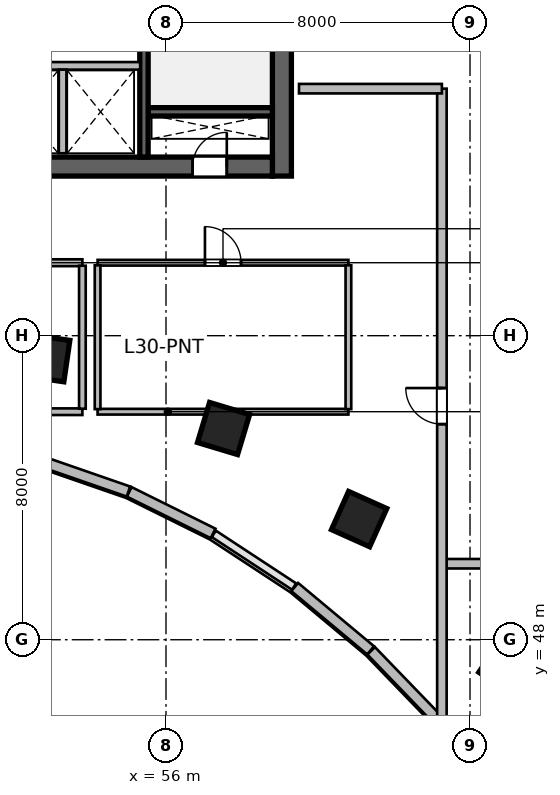
"""IFC4 building model, lengths in metres.
Left out: names, types, materials, properties, quantities, classifications, styles, units other than length and angle.
Written with IfcOpenShell. Run it as: python <this file> out.ifc"""

import sys

from ifc_helpers import new_model, si_unit, direction, frame, frame_2d, origin, origin_2d, place, context, subcontext, project, spatial, rectangle, extrude, source, transform, mapped, element, fill, save


model = new_model("IFC4")
c1 = context("Model", 3, precision=1e-05, world=origin(), true_north=direction((0.0, 1.0)))
c2 = subcontext(c1, "Body", "Model", "MODEL_VIEW")
j1 = project(units=[si_unit("LENGTHUNIT", "METRE"), si_unit("PLANEANGLEUNIT", "RADIAN")], contexts=[c1])
p1 = place(None, origin())
s1 = spatial("IfcSite", under=j1, at=p1, CompositionType="ELEMENT")
p2 = place(p1, origin())
s2 = spatial("IfcBuilding", under=s1, at=p2, CompositionType="ELEMENT")
p3 = place(p2, frame((0.0, 0.0, 127.2)))
s3 = spatial("IfcBuildingStorey", under=s2, at=p3, CompositionType="ELEMENT", Elevation=127.2)
m1 = source(origin(), c2, "Body", "SweptSolid", [
    extrude(rectangle(XDim=12.0, YDim=0.5, at=frame_2d((6.0, 0.0))), origin(), (0.0, 0.0, 1.0), 3.9),
])
p4 = place(p3, frame((59.05, 60.2, 0.0), z_axis=(0.0, 0.0, 1.0), x_axis=(0.0, 1.0, 0.0)))
e1 = element("IfcWall", 1, at=p4, inside=s3, PredefinedType="SHEAR", context=c2, shape_type="MappedRepresentation", body=[
    mapped(m1, transform((0.0, 0.0, 0.0), scale=1.0)),
])
m2 = source(origin(), c2, "Body", "SweptSolid", [
    extrude(rectangle(XDim=21.6, YDim=0.5, at=frame_2d((10.8, 0.0))), origin(), (0.0, 0.0, 1.0), 3.9),
])
p5 = place(p3, frame((37.2, 60.45, 0.0), z_axis=(0.0, 0.0, 1.0), x_axis=(1.0, 0.0, 0.0)))
e2 = element("IfcWall", 2, at=p5, inside=s3, PredefinedType="SHEAR", context=c2, shape_type="MappedRepresentation", body=[
    mapped(m2, transform((0.0, 0.0, 0.0), scale=1.0)),
])
p6 = place(p5, frame((1.1, 0.0, 0.0)))
e3 = element("IfcOpeningElement", 3, at=p6, cuts=e2, PredefinedType="OPENING", context=c2, shape_type="SweptSolid", body=[
    extrude(rectangle(XDim=1.15, YDim=2.15, at=frame_2d((0.575, 1.075))), frame((0.0, 0.26, 0.0), z_axis=(0.0, -1.0, 0.0), x_axis=(1.0, 0.0, 0.0)), (0.0, 0.0, 1.0), 0.52),
])
p7 = place(p5, frame((19.5, 0.0, 0.0)))
e4 = element("IfcOpeningElement", 4, at=p7, cuts=e2, PredefinedType="OPENING", context=c2, shape_type="SweptSolid", body=[
    extrude(rectangle(XDim=0.9, YDim=2.1, at=frame_2d((0.45, 1.05))), frame((0.0, 0.26, 0.0), z_axis=(0.0, -1.0, 0.0), x_axis=(1.0, 0.0, 0.0)), (0.0, 0.0, 1.0), 0.52),
])
p8 = place(p5, frame((12.02, 0.0, 0.0)))
e5 = element("IfcOpeningElement", 5, at=p8, cuts=e2, PredefinedType="OPENING", context=c2, shape_type="SweptSolid", body=[
    extrude(rectangle(XDim=1.6, YDim=2.15, at=frame_2d((0.8, 1.075))), frame((0.0, 0.26, 0.0), z_axis=(0.0, -1.0, 0.0), x_axis=(1.0, 0.0, 0.0)), (0.0, 0.0, 1.0), 0.52),
])
m3 = source(origin(), c2, "Body", "SweptSolid", [
    extrude(rectangle(XDim=3.27, YDim=0.22, at=frame_2d((1.635, 0.0))), origin(), (0.0, 0.0, 1.0), 3.9),
])
p9 = place(p3, frame((55.53, 61.89, 0.0), z_axis=(0.0, 0.0, 1.0), x_axis=(1.0, 0.0, 0.0)))
e6 = element("IfcWall", 6, at=p9, inside=s3, PredefinedType="SHEAR", context=c2, shape_type="MappedRepresentation", body=[
    mapped(m3, transform((0.0, 0.0, 0.0), scale=1.0)),
])
m4 = source(origin(), c2, "Body", "SweptSolid", [
    extrude(rectangle(XDim=11.0, YDim=0.22, at=frame_2d((5.5, 0.0))), origin(), (0.0, 0.0, 1.0), 3.9),
])
p10 = place(p3, frame((55.42, 60.7, 0.0), z_axis=(0.0, 0.0, 1.0), x_axis=(0.0, 1.0, 0.0)))
e7 = element("IfcWall", 7, at=p10, inside=s3, PredefinedType="SHEAR", context=c2, shape_type="MappedRepresentation", body=[
    mapped(m4, transform((0.0, 0.0, 0.0), scale=1.0)),
])
p11 = place(p10, frame((9.545, 0.0, 0.0)))
e8 = element("IfcOpeningElement", 8, at=p11, cuts=e7, PredefinedType="OPENING", context=c2, shape_type="SweptSolid", body=[
    extrude(rectangle(XDim=1.15, YDim=2.15, at=frame_2d((0.575, 1.075))), frame((0.0, 0.12, 0.0), z_axis=(0.0, -1.0, 0.0), x_axis=(1.0, 0.0, 0.0)), (0.0, 0.0, 1.0), 0.24),
])
m5 = source(origin(), c2, "Body", "SweptSolid", [
    extrude(rectangle(XDim=1.1, YDim=1.1, at=origin_2d()), origin(), (0.0, 0.0, 1.0), 3.9),
])
for number, where, z_axis, x_axis in (
    (9, (52.846, 55.411, 0.0), (0.0, 0.0, 1.0), (0.143, 0.99, 0.0)),
    (10, (57.515, 53.558, 0.0), (0.0, 0.0, 1.0), (0.289, 0.957, 0.0)),
    (11, (61.082, 51.175, 0.0), (0.0, 0.0, 1.0), (0.409, 0.912, 0.0)),
    (12, (64.996, 47.294, 0.0), (0.0, 0.0, 1.0), (0.558, 0.83, 0.0)),
):
    element("IfcColumn", number, at=place(p3, frame(where, z_axis=z_axis, x_axis=x_axis)), inside=s3, PredefinedType="COLUMN", context=c2, shape_type="MappedRepresentation", body=[
        mapped(m5, transform((0.0, 0.0, 0.0), scale=1.0)),
    ])
m6 = source(origin(), c2, "Body", "SweptSolid", [
    extrude(rectangle(XDim=2.68, YDim=0.28, at=frame_2d((1.34, 0.0))), origin(), (0.0, 0.0, 1.0), 3.65),
])
p12 = place(p3, frame((63.26, 45.78, 0.0), z_axis=(0.0, 0.0, 1.0), x_axis=(-0.694561996568, 0.719432855049, 0.0)))
e13 = element("IfcWall", 13, at=p12, inside=s3, PredefinedType="SOLIDWALL", context=c2, shape_type="MappedRepresentation", body=[
    mapped(m6, transform((0.0, 0.0, 0.0), scale=1.0)),
])
m7 = source(origin(), c2, "Body", "SweptSolid", [
    extrude(rectangle(XDim=2.601, YDim=0.28, at=frame_2d((1.3, 0.0))), origin(), (0.0, 0.0, 1.0), 3.65),
])
p13 = place(p3, frame((61.385, 47.721, 0.0), z_axis=(0.0, 0.0, 1.0), x_axis=(-0.76796730295, 0.640489048775, 0.0)))
e14 = element("IfcWall", 14, at=p13, inside=s3, PredefinedType="SOLIDWALL", context=c2, shape_type="MappedRepresentation", body=[
    mapped(m7, transform((0.0, 0.0, 0.0), scale=1.0)),
])
m8 = source(origin(), c2, "Body", "SweptSolid", [
    extrude(rectangle(XDim=2.462, YDim=0.28, at=frame_2d((1.231, 0.0))), origin(), (0.0, 0.0, 1.0), 3.65),
])
p14 = place(p3, frame((57.239, 50.797, 0.0), z_axis=(0.0, 0.0, 1.0), x_axis=(-0.8959882207, 0.444077817917, 0.0)))
e15 = element("IfcWall", 15, at=p14, inside=s3, PredefinedType="SOLIDWALL", context=c2, shape_type="MappedRepresentation", body=[
    mapped(m8, transform((0.0, 0.0, 0.0), scale=1.0)),
])
m9 = source(origin(), c2, "Body", "SweptSolid", [
    extrude(rectangle(XDim=2.411, YDim=0.28, at=frame_2d((1.205, 0.0))), origin(), (0.0, 0.0, 1.0), 3.65),
])
p15 = place(p3, frame((55.012, 51.899, 0.0), z_axis=(0.0, 0.0, 1.0), x_axis=(-0.944880068161, 0.327416640982, 0.0)))
e16 = element("IfcWall", 16, at=p15, inside=s3, PredefinedType="SOLIDWALL", context=c2, shape_type="MappedRepresentation", body=[
    mapped(m9, transform((0.0, 0.0, 0.0), scale=1.0)),
])
m10 = source(origin(), c2, "Body", "SweptSolid", [
    extrude(rectangle(XDim=4.1, YDim=0.2, at=frame_2d((2.05, 0.0))), origin(), (0.0, 0.0, 1.0), 3.65),
])
p16 = place(p3, frame((51.22, 63.1, 0.0), z_axis=(0.0, 0.0, 1.0), x_axis=(1.0, 0.0, 0.0)))
e17 = element("IfcWall", 17, at=p16, inside=s3, PredefinedType="SOLIDWALL", context=c2, shape_type="MappedRepresentation", body=[
    mapped(m10, transform((0.0, 0.0, 0.0), scale=1.0)),
])
m11 = source(origin(), c2, "Body", "SweptSolid", [
    extrude(rectangle(XDim=2.2, YDim=0.2, at=frame_2d((1.1, 0.0))), origin(), (0.0, 0.0, 1.0), 3.65),
])
p17 = place(p3, frame((53.28, 60.8, 0.0), z_axis=(0.0, 0.0, 1.0), x_axis=(0.0, 1.0, 0.0)))
e18 = element("IfcWall", 18, at=p17, inside=s3, PredefinedType="SOLIDWALL", context=c2, shape_type="MappedRepresentation", body=[
    mapped(m11, transform((0.0, 0.0, 0.0), scale=1.0)),
])
m12 = source(origin(), c2, "Body", "SweptSolid", [
    extrude(rectangle(XDim=3.248, YDim=0.175, at=frame_2d((1.624, 0.0))), origin(), (0.0, 0.0, 1.0), 3.65),
])
p18 = place(p3, frame((50.552, 54.0, 0.0), z_axis=(0.0, 0.0, 1.0), x_axis=(1.0, 0.0, 0.0)))
e19 = element("IfcWall", 19, at=p18, inside=s3, PredefinedType="PARTITIONING", context=c2, shape_type="MappedRepresentation", body=[
    mapped(m12, transform((0.0, 0.0, 0.0), scale=1.0)),
])
m13 = source(origin(), c2, "Body", "SweptSolid", [
    extrude(rectangle(XDim=3.248, YDim=0.18, at=frame_2d((1.624, 0.0))), origin(), (0.0, 0.0, 1.0), 3.65),
])
p19 = place(p3, frame((50.552, 57.92, 0.0), z_axis=(0.0, 0.0, 1.0), x_axis=(1.0, 0.0, 0.0)))
e20 = element("IfcWall", 20, at=p19, inside=s3, PredefinedType="PLUMBINGWALL", context=c2, shape_type="MappedRepresentation", body=[
    mapped(m13, transform((0.0, 0.0, 0.0), scale=1.0)),
])
p20 = place(p19, frame((1.149, 0.0, 0.0)))
e21 = element("IfcOpeningElement", 21, at=p20, cuts=e20, PredefinedType="OPENING", context=c2, shape_type="SweptSolid", body=[
    extrude(rectangle(XDim=0.95, YDim=2.12, at=frame_2d((0.475, 1.06))), frame((0.0, 0.1, 0.0), z_axis=(0.0, -1.0, 0.0), x_axis=(1.0, 0.0, 0.0)), (0.0, 0.0, 1.0), 0.2),
])
m14 = source(origin(), c2, "Body", "SweptSolid", [
    extrude(rectangle(XDim=3.763, YDim=0.175, at=frame_2d((1.881, 0.0))), origin(), (0.0, 0.0, 1.0), 3.65),
])
p21 = place(p3, frame((53.8, 54.079, 0.0), z_axis=(0.0, 0.0, 1.0), x_axis=(0.0, 1.0, 0.0)))
e22 = element("IfcWall", 22, at=p21, inside=s3, PredefinedType="PARTITIONING", context=c2, shape_type="MappedRepresentation", body=[
    mapped(m14, transform((0.0, 0.0, 0.0), scale=1.0)),
])
m15 = source(origin(), c2, "Body", "SweptSolid", [
    extrude(rectangle(XDim=6.6, YDim=0.15, at=frame_2d((3.3, 0.0))), origin(), (0.0, 0.0, 1.0), 3.095),
])
p22 = place(p3, frame((54.2, 54.0, 0.0), z_axis=(0.0, 0.0, 1.0), x_axis=(1.0, 0.0, 0.0)))
e23 = element("IfcWall", 23, at=p22, inside=s3, PredefinedType="PARTITIONING", context=c2, shape_type="MappedRepresentation", body=[
    mapped(m15, transform((0.0, 0.0, 0.0), scale=1.0)),
])
m16 = source(origin(), c2, "Body", "SweptSolid", [
    extrude(rectangle(XDim=6.6, YDim=0.15, at=frame_2d((3.3, 0.0))), origin(), (0.0, 0.0, 1.0), 3.65),
])
p23 = place(p3, frame((54.2, 57.92, 0.0), z_axis=(0.0, 0.0, 1.0), x_axis=(1.0, 0.0, 0.0)))
e24 = element("IfcWall", 24, at=p23, inside=s3, PredefinedType="PARTITIONING", context=c2, shape_type="MappedRepresentation", body=[
    mapped(m16, transform((0.0, 0.0, 0.0), scale=1.0)),
])
p24 = place(p23, frame((2.825, 0.0, 0.0)))
e25 = element("IfcOpeningElement", 25, at=p24, cuts=e24, PredefinedType="OPENING", context=c2, shape_type="SweptSolid", body=[
    extrude(rectangle(XDim=0.95, YDim=2.1, at=frame_2d((0.475, 1.05))), frame((0.0, 0.085, 0.0), z_axis=(0.0, -1.0, 0.0), x_axis=(1.0, 0.0, 0.0)), (0.0, 0.0, 1.0), 0.17),
])
m17 = source(origin(), c2, "Body", "SweptSolid", [
    extrude(rectangle(XDim=3.785, YDim=0.15, at=frame_2d((1.893, 0.0))), origin(), (0.0, 0.0, 1.0), 3.65),
])
for number, where, z_axis, x_axis in (
    (26, (54.2, 54.067, 0.0), (0.0, 0.0, 1.0), (0.0, 1.0, 0.0)),
    (27, (60.8, 54.067, 0.0), (0.0, 0.0, 1.0), (0.0, 1.0, 0.0)),
):
    element("IfcWall", number, at=place(p3, frame(where, z_axis=z_axis, x_axis=x_axis)), inside=s3, PredefinedType="PARTITIONING", context=c2, shape_type="MappedRepresentation", body=[
        mapped(m17, transform((0.0, 0.0, 0.0), scale=1.0)),
    ])
m18 = source(origin(), c2, "Body", "SweptSolid", [
    extrude(rectangle(XDim=2.5, YDim=0.25, at=frame_2d((1.25, 0.0))), origin(), (0.0, 0.0, 1.0), 3.65),
])
p25 = place(p3, frame((63.3, 50.0, 0.0), z_axis=(0.0, 0.0, 1.0), x_axis=(1.0, 0.0, 0.0)))
e28 = element("IfcWall", 28, at=p25, inside=s3, PredefinedType="PARTITIONING", context=c2, shape_type="MappedRepresentation", body=[
    mapped(m18, transform((0.0, 0.0, 0.0), scale=1.0)),
])
m19 = source(origin(), c2, "Body", "SweptSolid", [
    extrude(rectangle(XDim=16.706, YDim=0.25, at=frame_2d((8.353, 0.0))), origin(), (0.0, 0.0, 1.0), 2.942),
])
p26 = place(p3, frame((63.26, 45.794, 0.0), z_axis=(0.0, 0.0, 1.0), x_axis=(0.0, 1.0, 0.0)))
e29 = element("IfcWall", 29, at=p26, inside=s3, PredefinedType="PARTITIONING", context=c2, shape_type="MappedRepresentation", body=[
    mapped(m19, transform((0.0, 0.0, 0.0), scale=1.0)),
])
p27 = place(p26, frame((7.878, 0.0, 0.0)))
e30 = element("IfcOpeningElement", 30, at=p27, cuts=e29, PredefinedType="OPENING", context=c2, shape_type="SweptSolid", body=[
    extrude(rectangle(XDim=0.95, YDim=2.1, at=frame_2d((0.475, 1.05))), frame((0.0, 0.135, 0.0), z_axis=(0.0, -1.0, 0.0), x_axis=(1.0, 0.0, 0.0)), (0.0, 0.0, 1.0), 0.27),
])
m20 = source(origin(), c2, "Body", "SweptSolid", [
    extrude(rectangle(XDim=3.76, YDim=0.25, at=frame_2d((1.88, 0.0))), origin(), (0.0, 0.0, 1.0), 3.65),
])
p28 = place(p3, frame((59.5, 62.5, 0.0), z_axis=(0.0, 0.0, 1.0), x_axis=(1.0, 0.0, 0.0)))
e31 = element("IfcWall", 31, at=p28, inside=s3, PredefinedType="PARTITIONING", context=c2, shape_type="MappedRepresentation", body=[
    mapped(m20, transform((0.0, 0.0, 0.0), scale=1.0)),
])
m21 = source(origin(), c2, "Body", "SweptSolid", [
    extrude(rectangle(XDim=0.9, YDim=2.1, at=frame_2d((0.45, 1.05))), frame((0.0, 0.025, 0.0), z_axis=(0.0, -1.0, 0.0), x_axis=(1.0, 0.0, 0.0)), (0.0, 0.0, 1.0), 0.05),
])
p29 = place(p7, origin())
e32 = element("IfcDoor", 32, at=p29, inside=s3, OperationType="SINGLE_SWING_RIGHT", PredefinedType="DOOR", context=c2, shape_type="MappedRepresentation", body=[
    mapped(m21, transform((0.0, 0.0, 0.0), scale=1.0)),
])
fill(e4, e32)
m22 = source(origin(), c2, "Body", "SweptSolid", [
    extrude(rectangle(XDim=0.95, YDim=2.1, at=frame_2d((0.475, 1.05))), frame((0.0, 0.025, 0.0), z_axis=(0.0, -1.0, 0.0), x_axis=(1.0, 0.0, 0.0)), (0.0, 0.0, 1.0), 0.05),
])
p30 = place(p24, origin())
e33 = element("IfcDoor", 33, at=p30, inside=s3, OperationType="SINGLE_SWING_LEFT", PredefinedType="DOOR", context=c2, shape_type="MappedRepresentation", body=[
    mapped(m22, transform((0.0, 0.0, 0.0), scale=1.0)),
])
fill(e25, e33)
p31 = place(p27, origin())
e34 = element("IfcDoor", 34, at=p31, inside=s3, OperationType="SINGLE_SWING_RIGHT", PredefinedType="DOOR", context=c2, shape_type="MappedRepresentation", body=[
    mapped(m22, transform((0.0, 0.0, 0.0), scale=1.0)),
])
fill(e30, e34)
save(model, sys.argv[1])
